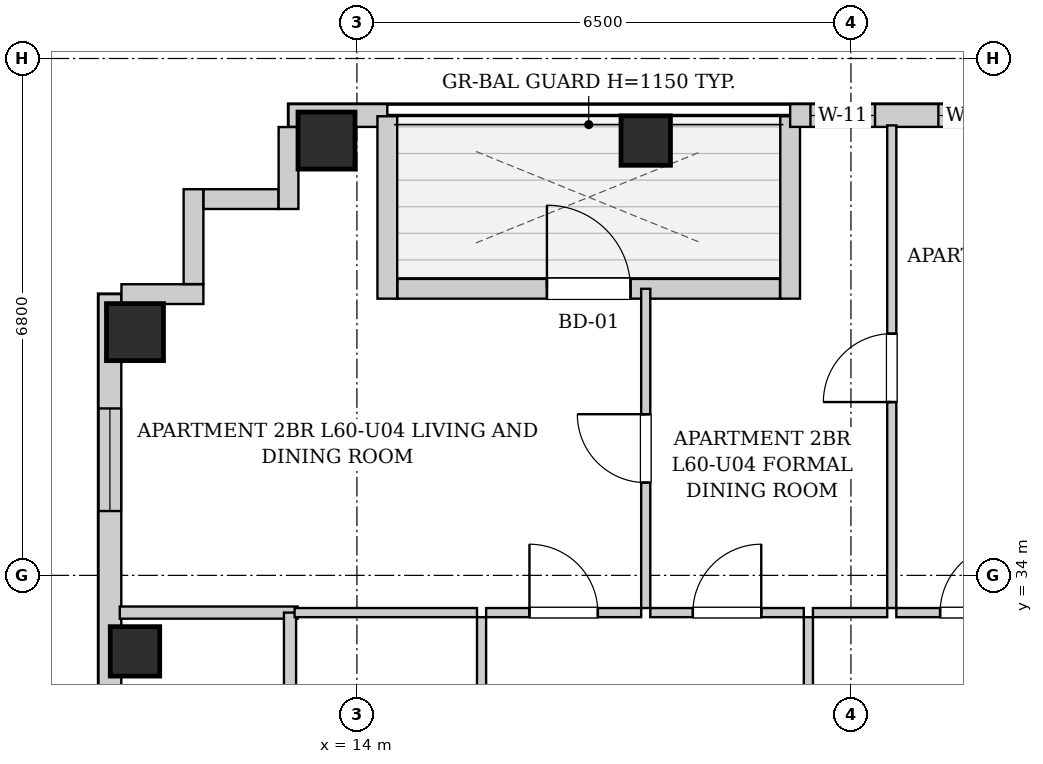
"""IFC4 building model, lengths in metres.
Left out: names, types, materials, properties, quantities, classifications, styles, units other than length and angle.
Written with IfcOpenShell. Run it as: python <this file> out.ifc"""

import sys

from ifc_helpers import new_model, si_unit, direction, frame, frame_2d, origin, origin_2d, place, context, subcontext, project, spatial, rectangle, extrude, element, fill, save


model = new_model("IFC4")
c1 = context("Model", 3, precision=1e-05, world=origin(), true_north=direction((0.0, 1.0)))
c2 = subcontext(c1, "Body", "Model", "MODEL_VIEW")
j1 = project(units=[si_unit("LENGTHUNIT", "METRE"), si_unit("PLANEANGLEUNIT", "RADIAN")], contexts=[c1])
p1 = place(None, origin())
s1 = spatial("IfcSite", under=j1, at=p1, CompositionType="ELEMENT")
p2 = place(p1, origin())
s2 = spatial("IfcBuilding", under=s1, at=p2, CompositionType="ELEMENT")
p3 = place(p2, frame((0.0, 0.0, 207.4)))
s3 = spatial("IfcBuildingStorey", under=s2, at=p3, CompositionType="ELEMENT", Elevation=207.4)
p4 = place(p3, frame((13.6, 39.72, 0.0), z_axis=(0.0, 0.0, 1.0), x_axis=(1.0, 0.0, 0.0)))
e1 = element("IfcColumn", 1, at=p4, inside=s3, PredefinedType="COLUMN", context=c2, shape_type="SweptSolid", body=[
    extrude(rectangle(XDim=0.75, YDim=0.75, at=origin_2d()), origin(), (0.0, 0.0, 1.0), 3.3),
])
for number, where, z_axis, x_axis in (
    (2, (17.8, 39.72, 0.0), (0.0, 0.0, 1.0), (1.0, 0.0, 0.0)),
    (3, (11.08, 33.0, 0.0), (0.0, 0.0, 1.0), (1.0, 0.0, 0.0)),
):
    element("IfcColumn", number, at=place(p3, frame(where, z_axis=z_axis, x_axis=x_axis)), inside=s3, PredefinedType="COLUMN", context=c2, shape_type="SweptSolid", body=[
        extrude(rectangle(XDim=0.65, YDim=0.65, at=origin_2d()), origin(), (0.0, 0.0, 1.0), 3.3),
    ])
p5 = place(p3, frame((11.08, 37.2, 0.0), z_axis=(0.0, 0.0, 1.0), x_axis=(1.0, 0.0, 0.0)))
e4 = element("IfcColumn", 4, at=p5, inside=s3, PredefinedType="COLUMN", context=c2, shape_type="SweptSolid", body=[
    extrude(rectangle(XDim=0.75, YDim=0.75, at=origin_2d()), origin(), (0.0, 0.0, 1.0), 3.3),
])
p6 = place(p3, frame((13.1, 40.05, 0.0), z_axis=(0.0, 0.0, 1.0), x_axis=(1.0, 0.0, 0.0)))
e5 = element("IfcWall", 5, at=p6, inside=s3, PredefinedType="SOLIDWALL", context=c2, shape_type="SweptSolid", body=[
    extrude(rectangle(XDim=1.3, YDim=0.3, at=frame_2d((0.65, 0.0))), origin(), (0.0, 0.0, 1.0), 3.04),
])
p7 = place(p3, frame((14.4, 40.04, 0.0), z_axis=(0.0, 0.0, 1.0), x_axis=(0.0, -1.0, 0.0)))
e6 = element("IfcWall", 6, at=p7, inside=s3, PredefinedType="SOLIDWALL", context=c2, shape_type="SweptSolid", body=[
    extrude(rectangle(XDim=2.4, YDim=0.26, at=frame_2d((1.2, 0.0))), origin(), (0.0, 0.0, 1.0), 3.04),
])
p8 = place(p3, frame((14.534, 37.77, 0.0), z_axis=(0.0, 0.0, 1.0), x_axis=(1.0, 0.0, 0.0)))
e7 = element("IfcWall", 7, at=p8, inside=s3, PredefinedType="SOLIDWALL", context=c2, shape_type="SweptSolid", body=[
    extrude(rectangle(XDim=5.032, YDim=0.26, at=frame_2d((2.516, 0.0))), origin(), (0.0, 0.0, 1.0), 3.04),
])
p9 = place(p8, frame((1.966, 0.0, 0.0)))
e8 = element("IfcOpeningElement", 8, at=p9, cuts=e7, PredefinedType="OPENING", context=c2, shape_type="SweptSolid", body=[
    extrude(rectangle(XDim=1.1, YDim=2.0, at=frame_2d((0.55, 1.0))), frame((0.0, 0.14, 0.0), z_axis=(0.0, -1.0, 0.0), x_axis=(1.0, 0.0, 0.0)), (0.0, 0.0, 1.0), 0.28),
])
p10 = place(p3, frame((19.7, 37.64, 0.0), z_axis=(0.0, 0.0, 1.0), x_axis=(0.0, 1.0, 0.0)))
e9 = element("IfcWall", 9, at=p10, inside=s3, PredefinedType="SOLIDWALL", context=c2, shape_type="SweptSolid", body=[
    extrude(rectangle(XDim=2.4, YDim=0.26, at=frame_2d((1.2, 0.0))), origin(), (0.0, 0.0, 1.0), 3.04),
])
p11 = place(p3, frame((19.7, 40.05, 0.0), z_axis=(0.0, 0.0, 1.0), x_axis=(1.0, 0.0, 0.0)))
e10 = element("IfcWall", 10, at=p11, inside=s3, PredefinedType="SOLIDWALL", context=c2, shape_type="SweptSolid", body=[
    extrude(rectangle(XDim=11.55, YDim=0.3, at=frame_2d((5.775, 0.0))), origin(), (0.0, 0.0, 1.0), 3.04),
])
p12 = place(p11, frame((0.267, 0.0, 0.55)))
e11 = element("IfcOpeningElement", 11, at=p12, cuts=e10, PredefinedType="OPENING", context=c2, shape_type="SweptSolid", body=[
    extrude(rectangle(XDim=0.85, YDim=1.2, at=frame_2d((0.425, 0.6))), frame((0.0, 0.16, 0.0), z_axis=(0.0, -1.0, 0.0), x_axis=(1.0, 0.0, 0.0)), (0.0, 0.0, 1.0), 0.32),
])
p13 = place(p11, frame((1.95, 0.0, 0.55)))
e12 = element("IfcOpeningElement", 12, at=p13, cuts=e10, PredefinedType="OPENING", context=c2, shape_type="SweptSolid", body=[
    extrude(rectangle(XDim=0.85, YDim=1.2, at=frame_2d((0.425, 0.6))), frame((0.0, 0.16, 0.0), z_axis=(0.0, -1.0, 0.0), x_axis=(1.0, 0.0, 0.0)), (0.0, 0.0, 1.0), 0.32),
])
p14 = place(p11, frame((7.8, 0.0, 0.55)))
e13 = element("IfcOpeningElement", 13, at=p14, cuts=e10, PredefinedType="OPENING", context=c2, shape_type="SweptSolid", body=[
    extrude(rectangle(XDim=1.35, YDim=1.2, at=frame_2d((0.675, 0.6))), frame((0.0, 0.16, 0.0), z_axis=(0.0, -1.0, 0.0), x_axis=(1.0, 0.0, 0.0)), (0.0, 0.0, 1.0), 0.32),
])
p15 = place(p3, frame((10.75, 6.3, 0.0), z_axis=(0.0, 0.0, 1.0), x_axis=(0.0, 1.0, 0.0)))
e14 = element("IfcWall", 14, at=p15, inside=s3, PredefinedType="SOLIDWALL", context=c2, shape_type="SweptSolid", body=[
    extrude(rectangle(XDim=31.4, YDim=0.3, at=frame_2d((15.7, 0.0))), origin(), (0.0, 0.0, 1.0), 3.04),
])
p16 = place(p15, frame((1.504, 0.0, 0.55)))
e15 = element("IfcOpeningElement", 15, at=p16, cuts=e14, PredefinedType="OPENING", context=c2, shape_type="SweptSolid", body=[
    extrude(rectangle(XDim=1.35, YDim=1.2, at=frame_2d((0.675, 0.6))), frame((0.0, 0.16, 0.0), z_axis=(0.0, -1.0, 0.0), x_axis=(1.0, 0.0, 0.0)), (0.0, 0.0, 1.0), 0.32),
])
p17 = place(p15, frame((28.546, 0.0, 0.55)))
e16 = element("IfcOpeningElement", 16, at=p17, cuts=e14, PredefinedType="OPENING", context=c2, shape_type="SweptSolid", body=[
    extrude(rectangle(XDim=1.35, YDim=1.2, at=frame_2d((0.675, 0.6))), frame((0.0, 0.16, 0.0), z_axis=(0.0, -1.0, 0.0), x_axis=(1.0, 0.0, 0.0)), (0.0, 0.0, 1.0), 0.32),
])
p18 = place(p15, frame((11.85, 0.0, 0.55)))
e17 = element("IfcOpeningElement", 17, at=p18, cuts=e14, PredefinedType="OPENING", context=c2, shape_type="SweptSolid", body=[
    extrude(rectangle(XDim=1.35, YDim=1.2, at=frame_2d((0.675, 0.6))), frame((0.0, 0.16, 0.0), z_axis=(0.0, -1.0, 0.0), x_axis=(1.0, 0.0, 0.0)), (0.0, 0.0, 1.0), 0.32),
])
p19 = place(p15, frame((9.185, 0.0, 0.55)))
e18 = element("IfcOpeningElement", 18, at=p19, cuts=e14, PredefinedType="OPENING", context=c2, shape_type="SweptSolid", body=[
    extrude(rectangle(XDim=1.35, YDim=1.2, at=frame_2d((0.675, 0.6))), frame((0.0, 0.16, 0.0), z_axis=(0.0, -1.0, 0.0), x_axis=(1.0, 0.0, 0.0)), (0.0, 0.0, 1.0), 0.32),
])
p20 = place(p15, frame((19.006, 0.0, 0.55)))
e19 = element("IfcOpeningElement", 19, at=p20, cuts=e14, PredefinedType="OPENING", context=c2, shape_type="SweptSolid", body=[
    extrude(rectangle(XDim=1.35, YDim=1.2, at=frame_2d((0.675, 0.6))), frame((0.0, 0.16, 0.0), z_axis=(0.0, -1.0, 0.0), x_axis=(1.0, 0.0, 0.0)), (0.0, 0.0, 1.0), 0.32),
])
p21 = place(p15, frame((20.616, 0.0, 0.55)))
e20 = element("IfcOpeningElement", 20, at=p21, cuts=e14, PredefinedType="OPENING", context=c2, shape_type="SweptSolid", body=[
    extrude(rectangle(XDim=1.35, YDim=1.2, at=frame_2d((0.675, 0.6))), frame((0.0, 0.16, 0.0), z_axis=(0.0, -1.0, 0.0), x_axis=(1.0, 0.0, 0.0)), (0.0, 0.0, 1.0), 0.32),
])
p22 = place(p3, frame((10.902, 37.7, 0.0), z_axis=(0.0, 0.0, 1.0), x_axis=(1.0, 0.0, 0.0)))
e21 = element("IfcWall", 21, at=p22, inside=s3, PredefinedType="SOLIDWALL", context=c2, shape_type="SweptSolid", body=[
    extrude(rectangle(XDim=1.078, YDim=0.26, at=frame_2d((0.539, 0.0))), origin(), (0.0, 0.0, 1.0), 3.04),
])
p23 = place(p3, frame((11.85, 37.832, 0.0), z_axis=(0.0, 0.0, 1.0), x_axis=(0.0, 1.0, 0.0)))
e22 = element("IfcWall", 22, at=p23, inside=s3, PredefinedType="SOLIDWALL", context=c2, shape_type="SweptSolid", body=[
    extrude(rectangle(XDim=1.248, YDim=0.26, at=frame_2d((0.624, 0.0))), origin(), (0.0, 0.0, 1.0), 3.04),
])
p24 = place(p3, frame((11.982, 38.95, 0.0), z_axis=(0.0, 0.0, 1.0), x_axis=(1.0, 0.0, 0.0)))
e23 = element("IfcWall", 23, at=p24, inside=s3, PredefinedType="SOLIDWALL", context=c2, shape_type="SweptSolid", body=[
    extrude(rectangle(XDim=0.986, YDim=0.26, at=frame_2d((0.493, 0.0))), origin(), (0.0, 0.0, 1.0), 3.04),
])
p25 = place(p3, frame((13.1, 38.82, 0.0), z_axis=(0.0, 0.0, 1.0), x_axis=(0.0, 1.0, 0.0)))
e24 = element("IfcWall", 24, at=p25, inside=s3, PredefinedType="SOLIDWALL", context=c2, shape_type="SweptSolid", body=[
    extrude(rectangle(XDim=1.078, YDim=0.26, at=frame_2d((0.539, 0.0))), origin(), (0.0, 0.0, 1.0), 3.04),
])
p26 = place(p3, frame((10.88, 33.51, 0.0), z_axis=(0.0, 0.0, 1.0), x_axis=(1.0, 0.0, 0.0)))
e25 = element("IfcWall", 25, at=p26, inside=s3, PredefinedType="PARTITIONING", context=c2, shape_type="SweptSolid", body=[
    extrude(rectangle(XDim=2.34, YDim=0.16, at=frame_2d((1.17, 0.0))), origin(), (0.0, 0.0, 1.0), 3.04),
])
p27 = place(p3, frame((13.12, 30.6, 0.0), z_axis=(0.0, 0.0, 1.0), x_axis=(0.0, 1.0, 0.0)))
e26 = element("IfcWall", 26, at=p27, inside=s3, PredefinedType="PARTITIONING", context=c2, shape_type="SweptSolid", body=[
    extrude(rectangle(XDim=2.91, YDim=0.16, at=frame_2d((1.455, 0.0))), origin(), (0.0, 0.0, 1.0), 3.04),
])
p28 = place(p3, frame((15.64, 30.6, 0.0), z_axis=(0.0, 0.0, 1.0), x_axis=(0.0, 1.0, 0.0)))
e27 = element("IfcWall", 27, at=p28, inside=s3, PredefinedType="PARTITIONING", context=c2, shape_type="SweptSolid", body=[
    extrude(rectangle(XDim=2.85, YDim=0.12, at=frame_2d((1.425, 0.0))), origin(), (0.0, 0.0, 1.0), 3.04),
])
p29 = place(p28, frame((0.995, 0.0, 0.0)))
e28 = element("IfcOpeningElement", 28, at=p29, cuts=e27, PredefinedType="OPENING", context=c2, shape_type="SweptSolid", body=[
    extrude(rectangle(XDim=0.86, YDim=2.05, at=frame_2d((0.43, 1.025))), frame((0.0, 0.07, 0.0), z_axis=(0.0, -1.0, 0.0), x_axis=(1.0, 0.0, 0.0)), (0.0, 0.0, 1.0), 0.14),
])
p30 = place(p3, frame((13.18, 33.51, 0.0), z_axis=(0.0, 0.0, 1.0), x_axis=(1.0, 0.0, 0.0)))
e29 = element("IfcWall", 29, at=p30, inside=s3, PredefinedType="PARTITIONING", context=c2, shape_type="SweptSolid", body=[
    extrude(rectangle(XDim=2.4, YDim=0.12, at=frame_2d((1.2, 0.0))), origin(), (0.0, 0.0, 1.0), 3.04),
])
p31 = place(p3, frame((19.94, 30.6, 0.0), z_axis=(0.0, 0.0, 1.0), x_axis=(0.0, 1.0, 0.0)))
e30 = element("IfcWall", 30, at=p31, inside=s3, PredefinedType="PARTITIONING", context=c2, shape_type="SweptSolid", body=[
    extrude(rectangle(XDim=2.85, YDim=0.12, at=frame_2d((1.425, 0.0))), origin(), (0.0, 0.0, 1.0), 3.04),
])
p32 = place(p31, frame((0.975, 0.0, 0.0)))
e31 = element("IfcOpeningElement", 31, at=p32, cuts=e30, PredefinedType="OPENING", context=c2, shape_type="SweptSolid", body=[
    extrude(rectangle(XDim=0.9, YDim=2.05, at=frame_2d((0.45, 1.025))), frame((0.0, 0.07, 0.0), z_axis=(0.0, -1.0, 0.0), x_axis=(1.0, 0.0, 0.0)), (0.0, 0.0, 1.0), 0.14),
])
p33 = place(p3, frame((15.7, 33.51, 0.0), z_axis=(0.0, 0.0, 1.0), x_axis=(1.0, 0.0, 0.0)))
e32 = element("IfcWall", 32, at=p33, inside=s3, PredefinedType="PARTITIONING", context=c2, shape_type="SweptSolid", body=[
    extrude(rectangle(XDim=2.04, YDim=0.12, at=frame_2d((1.02, 0.0))), origin(), (0.0, 0.0, 1.0), 3.04),
])
p34 = place(p33, frame((0.57, 0.0, 0.0)))
e33 = element("IfcOpeningElement", 33, at=p34, cuts=e32, PredefinedType="OPENING", context=c2, shape_type="SweptSolid", body=[
    extrude(rectangle(XDim=0.9, YDim=2.05, at=frame_2d((0.45, 1.025))), frame((0.0, 0.07, 0.0), z_axis=(0.0, -1.0, 0.0), x_axis=(1.0, 0.0, 0.0)), (0.0, 0.0, 1.0), 0.14),
])
p35 = place(p3, frame((17.86, 33.51, 0.0), z_axis=(0.0, 0.0, 1.0), x_axis=(1.0, 0.0, 0.0)))
e34 = element("IfcWall", 34, at=p35, inside=s3, PredefinedType="PARTITIONING", context=c2, shape_type="SweptSolid", body=[
    extrude(rectangle(XDim=2.02, YDim=0.12, at=frame_2d((1.01, 0.0))), origin(), (0.0, 0.0, 1.0), 3.04),
])
p36 = place(p35, frame((0.56, 0.0, 0.0)))
e35 = element("IfcOpeningElement", 35, at=p36, cuts=e34, PredefinedType="OPENING", context=c2, shape_type="SweptSolid", body=[
    extrude(rectangle(XDim=0.9, YDim=2.05, at=frame_2d((0.45, 1.025))), frame((0.0, 0.07, 0.0), z_axis=(0.0, -1.0, 0.0), x_axis=(1.0, 0.0, 0.0)), (0.0, 0.0, 1.0), 0.14),
])
p37 = place(p3, frame((20.0, 33.51, 0.0), z_axis=(0.0, 0.0, 1.0), x_axis=(1.0, 0.0, 0.0)))
e36 = element("IfcWall", 36, at=p37, inside=s3, PredefinedType="PARTITIONING", context=c2, shape_type="SweptSolid", body=[
    extrude(rectangle(XDim=0.977, YDim=0.12, at=frame_2d((0.489, 0.0))), origin(), (0.0, 0.0, 1.0), 3.04),
])
p38 = place(p3, frame((21.097, 33.51, 0.0), z_axis=(0.0, 0.0, 1.0), x_axis=(1.0, 0.0, 0.0)))
e37 = element("IfcWall", 37, at=p38, inside=s3, PredefinedType="PARTITIONING", context=c2, shape_type="SweptSolid", body=[
    extrude(rectangle(XDim=2.053, YDim=0.12, at=frame_2d((1.026, 0.0))), origin(), (0.0, 0.0, 1.0), 3.04),
])
p39 = place(p38, frame((0.576, 0.0, 0.0)))
e38 = element("IfcOpeningElement", 38, at=p39, cuts=e37, PredefinedType="OPENING", context=c2, shape_type="SweptSolid", body=[
    extrude(rectangle(XDim=0.9, YDim=2.05, at=frame_2d((0.45, 1.025))), frame((0.0, 0.07, 0.0), z_axis=(0.0, -1.0, 0.0), x_axis=(1.0, 0.0, 0.0)), (0.0, 0.0, 1.0), 0.14),
])
p40 = place(p3, frame((17.8, 33.57, 0.0), z_axis=(0.0, 0.0, 1.0), x_axis=(0.0, 1.0, 0.0)))
e39 = element("IfcWall", 39, at=p40, inside=s3, PredefinedType="PARTITIONING", context=c2, shape_type="SweptSolid", body=[
    extrude(rectangle(XDim=4.2, YDim=0.12, at=frame_2d((2.1, 0.0))), origin(), (0.0, 0.0, 1.0), 2.556),
])
p41 = place(p40, frame((1.65, 0.0, 0.0)))
e40 = element("IfcOpeningElement", 40, at=p41, cuts=e39, PredefinedType="OPENING", context=c2, shape_type="SweptSolid", body=[
    extrude(rectangle(XDim=0.9, YDim=2.05, at=frame_2d((0.45, 1.025))), frame((0.0, 0.07, 0.0), z_axis=(0.0, -1.0, 0.0), x_axis=(1.0, 0.0, 0.0)), (0.0, 0.0, 1.0), 0.14),
])
p42 = place(p3, frame((21.037, 33.57, 0.0), z_axis=(0.0, 0.0, 1.0), x_axis=(0.0, 1.0, 0.0)))
e41 = element("IfcWall", 41, at=p42, inside=s3, PredefinedType="PARTITIONING", context=c2, shape_type="SweptSolid", body=[
    extrude(rectangle(XDim=6.35, YDim=0.12, at=frame_2d((3.175, 0.0))), origin(), (0.0, 0.0, 1.0), 3.04),
])
p43 = place(p42, frame((2.71, 0.0, 0.0)))
e42 = element("IfcOpeningElement", 42, at=p43, cuts=e41, PredefinedType="OPENING", context=c2, shape_type="SweptSolid", body=[
    extrude(rectangle(XDim=0.9, YDim=2.05, at=frame_2d((0.45, 1.025))), frame((0.0, 0.07, 0.0), z_axis=(0.0, -1.0, 0.0), x_axis=(1.0, 0.0, 0.0)), (0.0, 0.0, 1.0), 0.14),
])
p44 = place(p34, origin())
e43 = element("IfcDoor", 43, at=p44, inside=s3, OperationType="SINGLE_SWING_LEFT", PredefinedType="DOOR", context=c2, shape_type="SweptSolid", body=[
    extrude(rectangle(XDim=0.9, YDim=2.05, at=frame_2d((0.45, 1.025))), frame((0.0, 0.025, 0.0), z_axis=(0.0, -1.0, 0.0), x_axis=(1.0, 0.0, 0.0)), (0.0, 0.0, 1.0), 0.05),
])
fill(e33, e43)
p45 = place(p36, origin())
e44 = element("IfcDoor", 44, at=p45, inside=s3, OperationType="SINGLE_SWING_RIGHT", PredefinedType="DOOR", context=c2, shape_type="SweptSolid", body=[
    extrude(rectangle(XDim=0.9, YDim=2.05, at=frame_2d((0.45, 1.025))), frame((0.0, 0.025, 0.0), z_axis=(0.0, -1.0, 0.0), x_axis=(1.0, 0.0, 0.0)), (0.0, 0.0, 1.0), 0.05),
])
fill(e35, e44)
p46 = place(p39, origin())
e45 = element("IfcDoor", 45, at=p46, inside=s3, OperationType="SINGLE_SWING_RIGHT", PredefinedType="DOOR", context=c2, shape_type="SweptSolid", body=[
    extrude(rectangle(XDim=0.9, YDim=2.05, at=frame_2d((0.45, 1.025))), frame((0.0, 0.025, 0.0), z_axis=(0.0, -1.0, 0.0), x_axis=(1.0, 0.0, 0.0)), (0.0, 0.0, 1.0), 0.05),
])
fill(e38, e45)
p47 = place(p41, origin())
e46 = element("IfcDoor", 46, at=p47, inside=s3, OperationType="SINGLE_SWING_RIGHT", PredefinedType="DOOR", context=c2, shape_type="SweptSolid", body=[
    extrude(rectangle(XDim=0.9, YDim=2.05, at=frame_2d((0.45, 1.025))), frame((0.0, 0.025, 0.0), z_axis=(0.0, -1.0, 0.0), x_axis=(1.0, 0.0, 0.0)), (0.0, 0.0, 1.0), 0.05),
])
fill(e40, e46)
p48 = place(p43, origin())
e47 = element("IfcDoor", 47, at=p48, inside=s3, OperationType="SINGLE_SWING_LEFT", PredefinedType="DOOR", context=c2, shape_type="SweptSolid", body=[
    extrude(rectangle(XDim=0.9, YDim=2.05, at=frame_2d((0.45, 1.025))), frame((0.0, 0.025, 0.0), z_axis=(0.0, -1.0, 0.0), x_axis=(1.0, 0.0, 0.0)), (0.0, 0.0, 1.0), 0.05),
])
fill(e42, e47)
p49 = place(p9, origin())
e48 = element("IfcDoor", 48, at=p49, inside=s3, OperationType="SINGLE_SWING_LEFT", PredefinedType="DOOR", context=c2, shape_type="SweptSolid", body=[
    extrude(rectangle(XDim=1.1, YDim=2.0, at=frame_2d((0.55, 1.0))), frame((0.0, 0.025, 0.0), z_axis=(0.0, -1.0, 0.0), x_axis=(1.0, 0.0, 0.0)), (0.0, 0.0, 1.0), 0.05),
])
fill(e8, e48)
p50 = place(p17, origin())
e49 = element("IfcWindow", 49, at=p50, inside=s3, PartitioningType="SINGLE_PANEL", PredefinedType="WINDOW", context=c2, shape_type="SweptSolid", body=[
    extrude(rectangle(XDim=1.35, YDim=1.2, at=frame_2d((0.675, 0.6))), frame((0.0, 0.03, 0.0), z_axis=(0.0, -1.0, 0.0), x_axis=(1.0, 0.0, 0.0)), (0.0, 0.0, 1.0), 0.06),
])
fill(e16, e49)
p51 = place(p12, origin())
e50 = element("IfcWindow", 50, at=p51, inside=s3, PartitioningType="SINGLE_PANEL", PredefinedType="WINDOW", context=c2, shape_type="SweptSolid", body=[
    extrude(rectangle(XDim=0.85, YDim=1.2, at=frame_2d((0.425, 0.6))), frame((0.0, 0.03, 0.0), z_axis=(0.0, -1.0, 0.0), x_axis=(1.0, 0.0, 0.0)), (0.0, 0.0, 1.0), 0.06),
])
fill(e11, e50)
p52 = place(p13, origin())
e51 = element("IfcWindow", 51, at=p52, inside=s3, PartitioningType="SINGLE_PANEL", PredefinedType="WINDOW", context=c2, shape_type="SweptSolid", body=[
    extrude(rectangle(XDim=0.85, YDim=1.2, at=frame_2d((0.425, 0.6))), frame((0.0, 0.03, 0.0), z_axis=(0.0, -1.0, 0.0), x_axis=(1.0, 0.0, 0.0)), (0.0, 0.0, 1.0), 0.06),
])
fill(e12, e51)
save(model, sys.argv[1])
